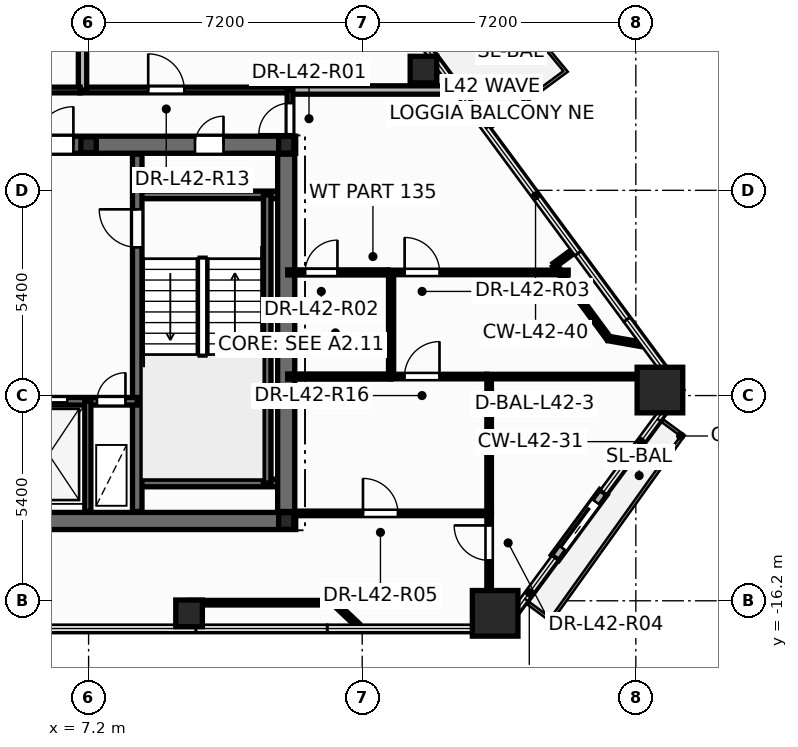
"""IFC4 building model, lengths in metres.
Left out: names, types, materials, properties, quantities, classifications, styles, units other than length and angle.
Written with IfcOpenShell. Run it as: python <this file> out.ifc"""

import sys

from ifc_helpers import new_model, si_unit, direction, frame, frame_2d, origin, origin_2d, place, context, subcontext, project, spatial, rectangle, hollow_rectangle, hollow_circle, i_section, extrude, element, fill, save


model = new_model("IFC4")
c1 = context("Model", 3, precision=1e-05, world=origin(), true_north=direction((0.0, 1.0)))
c2 = subcontext(c1, "Body", "Model", "MODEL_VIEW")
j1 = project(units=[si_unit("LENGTHUNIT", "METRE"), si_unit("PLANEANGLEUNIT", "RADIAN")], contexts=[c1])
p1 = place(None, origin())
s1 = spatial("IfcSite", under=j1, at=p1, CompositionType="ELEMENT")
p2 = place(p1, origin())
s2 = spatial("IfcBuilding", under=s1, at=p2, CompositionType="ELEMENT")
p3 = place(p2, frame((0.0, 0.0, 161.7)))
s3 = spatial("IfcBuildingStorey", under=s2, at=p3, CompositionType="ELEMENT", Elevation=161.7)
for number, where, z_axis, x_axis in (
    (1, (17.898, -16.53, 0.0), (0.0, 0.0, 1.0), (1.0, 0.0, 0.0)),
    (2, (22.234, -10.655, 0.0), (0.0, 0.0, 1.0), (1.0, 0.0, 0.0)),
):
    element("IfcColumn", number, at=place(p3, frame(where, z_axis=z_axis, x_axis=x_axis)), inside=s3, PredefinedType="COLUMN", context=c2, shape_type="SweptSolid", body=[
        extrude(hollow_rectangle(XDim=1.2, YDim=1.2, WallThickness=0.055, at=origin_2d()), origin(), (0.0, 0.0, 1.0), 3.6),
    ])
for number, where, z_axis, x_axis in (
    (3, (9.844, -16.53, 0.0), (0.0, 0.0, 1.0), (1.0, 0.0, 0.0)),
    (4, (16.012, -2.223, 0.0), (0.0, 0.0, 1.0), (1.0, 0.0, 0.0)),
):
    element("IfcColumn", number, at=place(p3, frame(where, z_axis=z_axis, x_axis=x_axis)), inside=s3, PredefinedType="COLUMN", context=c2, shape_type="SweptSolid", body=[
        extrude(hollow_circle(Radius=0.35, WallThickness=0.03, at=origin_2d()), origin(), (0.0, 0.0, 1.0), 3.6),
    ])
for number, where, z_axis, x_axis in (
    (5, (12.4, -14.1, 0.0), (0.0, 0.0, 1.0), (1.0, 0.0, 0.0)),
    (6, (12.4, -4.2, 0.0), (0.0, 0.0, 1.0), (1.0, 0.0, 0.0)),
):
    element("IfcColumn", number, at=place(p3, frame(where, z_axis=z_axis, x_axis=x_axis)), inside=s3, PredefinedType="COLUMN", context=c2, shape_type="SweptSolid", body=[
        extrude(i_section(OverallWidth=0.4, OverallDepth=0.44, WebThickness=0.028, FlangeThickness=0.04, at=origin_2d()), origin(), (0.0, 0.0, 1.0), 3.6),
    ])
p4 = place(p3, frame((7.2, -4.2, 0.0), z_axis=(0.0, 0.0, 1.0), x_axis=(1.0, 0.0, 0.0)))
e7 = element("IfcColumn", 7, at=p4, inside=s3, PredefinedType="PILASTER", context=c2, shape_type="SweptSolid", body=[
    extrude(i_section(OverallWidth=0.405, OverallDepth=0.414, WebThickness=0.022, FlangeThickness=0.032, at=origin_2d()), origin(), (0.0, 0.0, 1.0), 3.6),
])
p5 = place(p3, frame((19.475, -15.067, -0.015), z_axis=(0.0, 0.0, 1.0), x_axis=(0.593794270714, 0.804616905158, 0.0)))
e8 = element("IfcWall", 8, at=p5, inside=s3, PredefinedType="STANDARD", context=c2, shape_type="SweptSolid", body=[
    extrude(rectangle(XDim=2.14, YDim=0.24, at=frame_2d((1.07, 0.0))), origin(), (0.0, 0.0, 1.0), 2.807),
])
p6 = place(p5, frame((0.32, 0.0, 0.015)))
e9 = element("IfcOpeningElement", 9, at=p6, cuts=e8, PredefinedType="OPENING", context=c2, shape_type="SweptSolid", body=[
    extrude(rectangle(XDim=1.506, YDim=2.204, at=frame_2d((0.75, 1.102))), frame((0.0, 0.13, 0.0), z_axis=(0.0, -1.0, 0.0), x_axis=(1.0, 0.0, 0.0)), (0.0, 0.0, 1.0), 0.26),
])
p7 = place(p3, frame((-12.65, -14.1, 0.0), z_axis=(0.0, 0.0, 1.0), x_axis=(1.0, 0.0, 0.0)))
e10 = element("IfcWall", 10, at=p7, inside=s3, PredefinedType="SHEAR", context=c2, shape_type="SweptSolid", body=[
    extrude(rectangle(XDim=25.3, YDim=0.45, at=frame_2d((12.65, 0.0))), origin(), (0.0, 0.0, 1.0), 3.6),
])
p8 = place(p3, frame((-12.65, -4.2, 0.0), z_axis=(0.0, 0.0, 1.0), x_axis=(1.0, 0.0, 0.0)))
e11 = element("IfcWall", 11, at=p8, inside=s3, PredefinedType="SHEAR", context=c2, shape_type="SweptSolid", body=[
    extrude(rectangle(XDim=25.3, YDim=0.45, at=frame_2d((12.65, 0.0))), origin(), (0.0, 0.0, 1.0), 3.6),
])
p9 = place(p8, frame((1.85, 0.0, 0.0)))
e12 = element("IfcOpeningElement", 12, at=p9, cuts=e11, PredefinedType="OPENING", context=c2, shape_type="SweptSolid", body=[
    extrude(rectangle(XDim=0.756, YDim=2.054, at=frame_2d((0.375, 1.027))), frame((0.0, 0.235, 0.0), z_axis=(0.0, -1.0, 0.0), x_axis=(1.0, 0.0, 0.0)), (0.0, 0.0, 1.0), 0.47),
])
p10 = place(p8, frame((22.65, 0.0, 0.0)))
e13 = element("IfcOpeningElement", 13, at=p10, cuts=e11, PredefinedType="OPENING", context=c2, shape_type="SweptSolid", body=[
    extrude(rectangle(XDim=0.756, YDim=2.054, at=frame_2d((0.375, 1.027))), frame((0.0, 0.235, 0.0), z_axis=(0.0, -1.0, 0.0), x_axis=(1.0, 0.0, 0.0)), (0.0, 0.0, 1.0), 0.47),
])
p11 = place(p8, frame((5.85, 0.0, 0.0)))
e14 = element("IfcOpeningElement", 14, at=p11, cuts=e11, PredefinedType="OPENING", context=c2, shape_type="SweptSolid", body=[
    extrude(rectangle(XDim=1.006, YDim=2.104, at=frame_2d((0.5, 1.052))), frame((0.0, 0.235, 0.0), z_axis=(0.0, -1.0, 0.0), x_axis=(1.0, 0.0, 0.0)), (0.0, 0.0, 1.0), 0.47),
])
p12 = place(p8, frame((10.35, 0.0, 0.0)))
e15 = element("IfcOpeningElement", 15, at=p12, cuts=e11, PredefinedType="OPENING", context=c2, shape_type="SweptSolid", body=[
    extrude(rectangle(XDim=1.406, YDim=2.154, at=frame_2d((0.7, 1.077))), frame((0.0, 0.235, 0.0), z_axis=(0.0, -1.0, 0.0), x_axis=(1.0, 0.0, 0.0)), (0.0, 0.0, 1.0), 0.47),
])
p13 = place(p8, frame((18.45, 0.0, 0.0)))
e16 = element("IfcOpeningElement", 16, at=p13, cuts=e11, PredefinedType="OPENING", context=c2, shape_type="SweptSolid", body=[
    extrude(rectangle(XDim=1.006, YDim=2.104, at=frame_2d((0.5, 1.052))), frame((0.0, 0.235, 0.0), z_axis=(0.0, -1.0, 0.0), x_axis=(1.0, 0.0, 0.0)), (0.0, 0.0, 1.0), 0.47),
])
for number, where, z_axis, x_axis in (
    (17, (8.48, -5.52, 0.0), (0.0, 0.0, 1.0), (1.0, 0.0, 0.0)),
    (18, (8.48, -13.1, 0.0), (0.0, 0.0, 1.0), (1.0, 0.0, 0.0)),
):
    element("IfcWall", number, at=place(p3, frame(where, z_axis=z_axis, x_axis=x_axis)), inside=s3, PredefinedType="SOLIDWALL", context=c2, shape_type="SweptSolid", body=[
        extrude(rectangle(XDim=3.87, YDim=0.2, at=frame_2d((1.935, 0.0))), origin(), (0.0, 0.0, 1.0), 3.6),
    ])
p14 = place(p3, frame((11.9, -13.1, 0.0), z_axis=(0.0, 0.0, 1.0), x_axis=(0.0, 1.0, 0.0)))
e19 = element("IfcWall", 19, at=p14, inside=s3, PredefinedType="SOLIDWALL", context=c2, shape_type="SweptSolid", body=[
    extrude(rectangle(XDim=7.58, YDim=0.2, at=frame_2d((3.79, 0.0))), origin(), (0.0, 0.0, 1.0), 3.6),
])
p15 = place(p3, frame((8.48, -13.85, 0.0), z_axis=(0.0, 0.0, 1.0), x_axis=(0.0, 1.0, 0.0)))
e20 = element("IfcWall", 20, at=p15, inside=s3, PredefinedType="SHEAR", context=c2, shape_type="SweptSolid", body=[
    extrude(rectangle(XDim=9.4, YDim=0.25, at=frame_2d((4.7, 0.0))), origin(), (0.0, 0.0, 1.0), 3.6),
])
p16 = place(p15, frame((6.95, 0.0, 0.0)))
e21 = element("IfcOpeningElement", 21, at=p16, cuts=e20, PredefinedType="OPENING", context=c2, shape_type="SweptSolid", body=[
    extrude(rectangle(XDim=1.006, YDim=2.104, at=frame_2d((0.5, 1.052))), frame((0.0, 0.135, 0.0), z_axis=(0.0, -1.0, 0.0), x_axis=(1.0, 0.0, 0.0)), (0.0, 0.0, 1.0), 0.27),
])
p17 = place(p3, frame((5.12, -10.95, 0.0), z_axis=(0.0, 0.0, 1.0), x_axis=(1.0, 0.0, 0.0)))
e22 = element("IfcWall", 22, at=p17, inside=s3, PredefinedType="SOLIDWALL", context=c2, shape_type="SweptSolid", body=[
    extrude(rectangle(XDim=3.36, YDim=0.2, at=frame_2d((1.68, 0.0))), origin(), (0.0, 0.0, 1.0), 3.6),
])
p18 = place(p17, frame((0.42, 0.0, 0.0)))
e23 = element("IfcOpeningElement", 23, at=p18, cuts=e22, PredefinedType="OPENING", context=c2, shape_type="SweptSolid", body=[
    extrude(rectangle(XDim=1.106, YDim=2.104, at=frame_2d((0.55, 1.052))), frame((0.0, 0.11, 0.0), z_axis=(0.0, -1.0, 0.0), x_axis=(1.0, 0.0, 0.0)), (0.0, 0.0, 1.0), 0.22),
])
p19 = place(p17, frame((2.3, 0.0, 0.0)))
e24 = element("IfcOpeningElement", 24, at=p19, cuts=e22, PredefinedType="OPENING", context=c2, shape_type="SweptSolid", body=[
    extrude(rectangle(XDim=0.756, YDim=2.054, at=frame_2d((0.375, 1.027))), frame((0.0, 0.11, 0.0), z_axis=(0.0, -1.0, 0.0), x_axis=(1.0, 0.0, 0.0)), (0.0, 0.0, 1.0), 0.22),
])
p20 = place(p3, frame((7.18, -13.85, 0.0), z_axis=(0.0, 0.0, 1.0), x_axis=(0.0, 1.0, 0.0)))
e25 = element("IfcWall", 25, at=p20, inside=s3, PredefinedType="PARTITIONING", context=c2, shape_type="SweptSolid", body=[
    extrude(rectangle(XDim=2.9, YDim=0.16, at=frame_2d((1.45, 0.0))), origin(), (0.0, 0.0, 1.0), 2.475),
])
p21 = place(p3, frame((12.4, -13.85, 0.0), z_axis=(0.0, 0.0, 1.0), x_axis=(0.0, 1.0, 0.0)))
e26 = element("IfcWall", 26, at=p21, inside=s3, PredefinedType="SHEAR", context=c2, shape_type="SweptSolid", body=[
    extrude(rectangle(XDim=9.4, YDim=0.45, at=frame_2d((4.7, 0.0))), origin(), (0.0, 0.0, 1.0), 3.6),
])
p22 = place(p3, frame((6.98, -2.76, 0.0), z_axis=(0.0, 0.0, 1.0), x_axis=(1.0, 0.0, 0.0)))
e27 = element("IfcWall", 27, at=p22, inside=s3, PredefinedType="PARTITIONING", context=c2, shape_type="SweptSolid", body=[
    extrude(rectangle(XDim=5.52, YDim=0.15, at=frame_2d((2.76, 0.0))), origin(), (0.0, 0.0, 1.0), 2.325),
])
p23 = place(p22, frame((1.788, 0.0, 0.0)))
e28 = element("IfcOpeningElement", 28, at=p23, cuts=e27, PredefinedType="OPENING", context=c2, shape_type="SweptSolid", body=[
    extrude(rectangle(XDim=0.956, YDim=2.104, at=frame_2d((0.475, 1.052))), frame((0.0, 0.085, 0.0), z_axis=(0.0, -1.0, 0.0), x_axis=(1.0, 0.0, 0.0)), (0.0, 0.0, 1.0), 0.17),
])
p24 = place(p3, frame((12.652, -13.9, 0.0), z_axis=(0.0, 0.0, 1.0), x_axis=(1.0, 0.0, 0.0)))
e29 = element("IfcWall", 29, at=p24, inside=s3, PredefinedType="PARTITIONING", context=c2, shape_type="SweptSolid", body=[
    extrude(rectangle(XDim=5.088, YDim=0.12, at=frame_2d((2.544, 0.0))), origin(), (0.0, 0.0, 1.0), 3.35),
])
p25 = place(p24, frame((1.768, 0.0, 0.0)))
e30 = element("IfcOpeningElement", 30, at=p25, cuts=e29, PredefinedType="OPENING", context=c2, shape_type="SweptSolid", body=[
    extrude(rectangle(XDim=0.926, YDim=2.104, at=frame_2d((0.46, 1.052))), frame((0.0, 0.07, 0.0), z_axis=(0.0, -1.0, 0.0), x_axis=(1.0, 0.0, 0.0)), (0.0, 0.0, 1.0), 0.14),
])
p26 = place(p3, frame((7.04, -2.76, 0.0), z_axis=(0.0, 0.0, 1.0), x_axis=(0.0, 1.0, 0.0)))
e31 = element("IfcWall", 31, at=p26, inside=s3, PredefinedType="PARTITIONING", context=c2, shape_type="SweptSolid", body=[
    extrude(rectangle(XDim=4.8, YDim=0.22, at=frame_2d((2.4, 0.0))), origin(), (0.0, 0.0, 1.0), 2.325),
])
p27 = place(p3, frame((17.68, -10.3, 0.0), z_axis=(0.0, 0.0, 1.0), x_axis=(1.0, 0.0, 0.0)))
e32 = element("IfcWall", 32, at=p27, inside=s3, PredefinedType="PARTITIONING", context=c2, shape_type="SweptSolid", body=[
    extrude(rectangle(XDim=4.79, YDim=0.12, at=frame_2d((2.395, 0.0))), origin(), (0.0, 0.0, 1.0), 2.325),
])
p28 = place(p3, frame((15.08, -7.56, 0.0), z_axis=(0.0, 0.0, 1.0), x_axis=(1.0, 0.0, 0.0)))
e33 = element("IfcWall", 33, at=p28, inside=s3, PredefinedType="PARTITIONING", context=c2, shape_type="SweptSolid", body=[
    extrude(rectangle(XDim=4.74, YDim=0.12, at=frame_2d((2.37, 0.0))), origin(), (0.0, 0.0, 1.0), 2.325),
])
p29 = place(p28, frame((0.436, 0.0, 0.0)))
e34 = element("IfcOpeningElement", 34, at=p29, cuts=e33, PredefinedType="OPENING", context=c2, shape_type="SweptSolid", body=[
    extrude(rectangle(XDim=0.926, YDim=2.104, at=frame_2d((0.46, 1.052))), frame((0.0, 0.07, 0.0), z_axis=(0.0, -1.0, 0.0), x_axis=(1.0, 0.0, 0.0)), (0.0, 0.0, 1.0), 0.14),
])
p30 = place(p3, frame((2.36, -2.76, 0.0), z_axis=(0.0, 0.0, 1.0), x_axis=(1.0, 0.0, 0.0)))
e35 = element("IfcWall", 35, at=p30, inside=s3, PredefinedType="PARTITIONING", context=c2, shape_type="SweptSolid", body=[
    extrude(rectangle(XDim=4.618, YDim=0.15, at=frame_2d((2.309, 0.0))), origin(), (0.0, 0.0, 1.0), 2.919),
])
p31 = place(p3, frame((12.5, -2.76, 0.0), z_axis=(0.0, 0.0, 1.0), x_axis=(1.0, 0.0, 0.0)))
e36 = element("IfcWall", 36, at=p31, inside=s3, PredefinedType="PARTITIONING", context=c2, shape_type="SweptSolid", body=[
    extrude(rectangle(XDim=4.405, YDim=0.22, at=frame_2d((2.203, 0.0))), origin(), (0.0, 0.0, 1.0), 2.792),
])
p32 = place(p3, frame((9.846, -16.25, 0.0), z_axis=(0.0, 0.0, 1.0), x_axis=(1.0, 0.0, 0.0)))
e37 = element("IfcWall", 37, at=p32, inside=s3, PredefinedType="PARTITIONING", context=c2, shape_type="SweptSolid", body=[
    extrude(rectangle(XDim=3.811, YDim=0.12, at=frame_2d((1.906, 0.0))), origin(), (0.0, 0.0, 1.0), 2.792),
])
p33 = place(p3, frame((17.74, -13.9, 0.0), z_axis=(0.0, 0.0, 1.0), x_axis=(0.0, 1.0, 0.0)))
e38 = element("IfcWall", 38, at=p33, inside=s3, PredefinedType="PARTITIONING", context=c2, shape_type="SweptSolid", body=[
    extrude(rectangle(XDim=3.6, YDim=0.12, at=frame_2d((1.8, 0.0))), origin(), (0.0, 0.0, 1.0), 3.35),
])
p34 = place(p3, frame((17.74, -16.93, 0.0), z_axis=(0.0, 0.0, 1.0), x_axis=(0.0, 1.0, 0.0)))
e39 = element("IfcWall", 39, at=p34, inside=s3, PredefinedType="PARTITIONING", context=c2, shape_type="SweptSolid", body=[
    extrude(rectangle(XDim=3.03, YDim=0.12, at=frame_2d((1.515, 0.0))), origin(), (0.0, 0.0, 1.0), 2.792),
])
p35 = place(p34, frame((1.793, 0.0, 0.0)))
e40 = element("IfcOpeningElement", 40, at=p35, cuts=e39, PredefinedType="OPENING", context=c2, shape_type="SweptSolid", body=[
    extrude(rectangle(XDim=0.926, YDim=2.104, at=frame_2d((0.46, 1.052))), frame((0.0, 0.07, 0.0), z_axis=(0.0, -1.0, 0.0), x_axis=(1.0, 0.0, 0.0)), (0.0, 0.0, 1.0), 0.14),
])
p36 = place(p3, frame((12.44, -7.56, 0.0), z_axis=(0.0, 0.0, 1.0), x_axis=(1.0, 0.0, 0.0)))
e41 = element("IfcWall", 41, at=p36, inside=s3, PredefinedType="PARTITIONING", context=c2, shape_type="SweptSolid", body=[
    extrude(rectangle(XDim=2.638, YDim=0.135, at=frame_2d((1.319, 0.0))), origin(), (0.0, 0.0, 1.0), 2.792),
])
p37 = place(p36, frame((0.458, 0.0, 0.0)))
e42 = element("IfcOpeningElement", 42, at=p37, cuts=e41, PredefinedType="OPENING", context=c2, shape_type="SweptSolid", body=[
    extrude(rectangle(XDim=0.856, YDim=2.104, at=frame_2d((0.425, 1.052))), frame((0.0, 0.078, 0.0), z_axis=(0.0, -1.0, 0.0), x_axis=(1.0, 0.0, 0.0)), (0.0, 0.0, 1.0), 0.155),
])
p38 = place(p3, frame((15.16, -10.3, 0.0), z_axis=(0.0, 0.0, 1.0), x_axis=(0.0, 1.0, 0.0)))
e43 = element("IfcWall", 43, at=p38, inside=s3, PredefinedType="PARTITIONING", context=c2, shape_type="SweptSolid", body=[
    extrude(rectangle(XDim=2.74, YDim=0.135, at=frame_2d((1.37, 0.0))), origin(), (0.0, 0.0, 1.0), 3.35),
])
p39 = place(p3, frame((12.44, -10.3, 0.0), z_axis=(0.0, 0.0, 1.0), x_axis=(1.0, 0.0, 0.0)))
e44 = element("IfcWall", 44, at=p39, inside=s3, PredefinedType="PARTITIONING", context=c2, shape_type="SweptSolid", body=[
    extrude(rectangle(XDim=2.72, YDim=0.135, at=frame_2d((1.36, 0.0))), origin(), (0.0, 0.0, 1.0), 2.792),
])
p40 = place(p3, frame((15.16, -10.3, 0.0), z_axis=(0.0, 0.0, 1.0), x_axis=(1.0, 0.0, 0.0)))
e45 = element("IfcWall", 45, at=p40, inside=s3, PredefinedType="PARTITIONING", context=c2, shape_type="SweptSolid", body=[
    extrude(rectangle(XDim=2.518, YDim=0.12, at=frame_2d((1.259, 0.0))), origin(), (0.0, 0.0, 1.0), 3.35),
])
p41 = place(p40, frame((0.354, 0.0, 0.0)))
e46 = element("IfcOpeningElement", 46, at=p41, cuts=e45, PredefinedType="OPENING", context=c2, shape_type="SweptSolid", body=[
    extrude(rectangle(XDim=0.926, YDim=2.104, at=frame_2d((0.46, 1.052))), frame((0.0, 0.07, 0.0), z_axis=(0.0, -1.0, 0.0), x_axis=(1.0, 0.0, 0.0)), (0.0, 0.0, 1.0), 0.14),
])
p42 = place(p3, frame((20.887, -9.3, 0.0), z_axis=(0.0, 0.0, 1.0), x_axis=(-0.593808475203, 0.804606422282, 0.0)))
e47 = element("IfcWall", 47, at=p42, inside=s3, PredefinedType="PARTITIONING", context=c2, shape_type="SweptSolid", body=[
    extrude(rectangle(XDim=2.404, YDim=0.12, at=frame_2d((1.202, 0.0))), origin(), (0.0, 0.0, 1.0), 3.35),
])
p43 = place(p3, frame((12.5, -4.24, 0.0), z_axis=(0.0, 0.0, 1.0), x_axis=(0.0, 1.0, 0.0)))
e48 = element("IfcWall", 48, at=p43, inside=s3, PredefinedType="PARTITIONING", context=c2, shape_type="SweptSolid", body=[
    extrude(rectangle(XDim=1.48, YDim=0.15, at=frame_2d((0.74, 0.0))), origin(), (0.0, 0.0, 1.0), 2.325),
])
p44 = place(p43, frame((0.315, 0.0, 0.0)))
e49 = element("IfcOpeningElement", 49, at=p44, cuts=e48, PredefinedType="OPENING", context=c2, shape_type="SweptSolid", body=[
    extrude(rectangle(XDim=0.826, YDim=2.104, at=frame_2d((0.41, 1.052))), frame((0.0, 0.085, 0.0), z_axis=(0.0, -1.0, 0.0), x_axis=(1.0, 0.0, 0.0)), (0.0, 0.0, 1.0), 0.17),
])
for number, where, z_axis, x_axis in (
    (50, (13.658, -16.25, 0.0), (0.0, 0.0, 1.0), (0.726, -0.687, 0.0)),
    (51, (21.724, -9.448, 0.0), (0.0, 0.0, 1.0), (-0.985, 0.174, 0.0)),
):
    element("IfcWall", number, at=place(p3, frame(where, z_axis=z_axis, x_axis=x_axis)), inside=s3, PredefinedType="PARTITIONING", context=c2, shape_type="SweptSolid", body=[
        extrude(rectangle(XDim=0.85, YDim=0.12, at=frame_2d((0.425, 0.0))), origin(), (0.0, 0.0, 1.0), 2.792),
    ])
for number, where, z_axis, x_axis in (
    (52, (19.459, -7.366, 0.0), (0.0, 0.0, 1.0), (0.805, 0.594, 0.0)),
    (53, (9.846, -16.92, 0.0), (0.0, 0.0, 1.0), (0.0, 1.0, 0.0)),
):
    element("IfcWall", number, at=place(p3, frame(where, z_axis=z_axis, x_axis=x_axis)), inside=s3, PredefinedType="PARTITIONING", context=c2, shape_type="SweptSolid", body=[
        extrude(rectangle(XDim=0.67, YDim=0.12, at=frame_2d((0.335, 0.0))), origin(), (0.0, 0.0, 1.0), 2.792),
    ])
p45 = place(p6, origin())
e54 = element("IfcDoor", 54, at=p45, inside=s3, OperationType="SLIDING_TO_RIGHT", PredefinedType="DOOR", context=c2, shape_type="SweptSolid", body=[
    extrude(rectangle(XDim=1.5, YDim=2.2, at=frame_2d((0.75, 1.1))), frame((0.0, 0.025, 0.0), z_axis=(0.0, -1.0, 0.0), x_axis=(1.0, 0.0, 0.0)), (0.0, 0.0, 1.0), 0.05),
])
fill(e9, e54)
p46 = place(p16, origin())
e55 = element("IfcDoor", 55, at=p46, inside=s3, OperationType="SINGLE_SWING_RIGHT", PredefinedType="DOOR", context=c2, shape_type="SweptSolid", body=[
    extrude(rectangle(XDim=1.0, YDim=2.1, at=frame_2d((0.5, 1.05))), frame((0.0, 0.025, 0.0), z_axis=(0.0, -1.0, 0.0), x_axis=(1.0, 0.0, 0.0)), (0.0, 0.0, 1.0), 0.05),
])
fill(e21, e55)
p47 = place(p18, origin())
e56 = element("IfcDoor", 56, at=p47, inside=s3, OperationType="DOUBLE_DOOR_SLIDING", PredefinedType="DOOR", context=c2, shape_type="SweptSolid", body=[
    extrude(rectangle(XDim=1.1, YDim=2.1, at=frame_2d((0.55, 1.05))), frame((0.0, 0.025, 0.0), z_axis=(0.0, -1.0, 0.0), x_axis=(1.0, 0.0, 0.0)), (0.0, 0.0, 1.0), 0.05),
])
fill(e23, e56)
p48 = place(p19, origin())
e57 = element("IfcDoor", 57, at=p48, inside=s3, OperationType="SINGLE_SWING_RIGHT", PredefinedType="DOOR", context=c2, shape_type="SweptSolid", body=[
    extrude(rectangle(XDim=0.75, YDim=2.05, at=frame_2d((0.375, 1.025))), frame((0.0, 0.025, 0.0), z_axis=(0.0, -1.0, 0.0), x_axis=(1.0, 0.0, 0.0)), (0.0, 0.0, 1.0), 0.05),
])
fill(e24, e57)
p49 = place(p10, origin())
e58 = element("IfcDoor", 58, at=p49, inside=s3, OperationType="SINGLE_SWING_RIGHT", PredefinedType="DOOR", context=c2, shape_type="SweptSolid", body=[
    extrude(rectangle(XDim=0.75, YDim=2.05, at=frame_2d((0.375, 1.025))), frame((0.0, 0.025, 0.0), z_axis=(0.0, -1.0, 0.0), x_axis=(1.0, 0.0, 0.0)), (0.0, 0.0, 1.0), 0.05),
])
fill(e13, e58)
p50 = place(p13, origin())
e59 = element("IfcDoor", 59, at=p50, inside=s3, OperationType="SINGLE_SWING_RIGHT", PredefinedType="DOOR", context=c2, shape_type="SweptSolid", body=[
    extrude(rectangle(XDim=1.0, YDim=2.1, at=frame_2d((0.5, 1.05))), frame((0.0, 0.025, 0.0), z_axis=(0.0, -1.0, 0.0), x_axis=(1.0, 0.0, 0.0)), (0.0, 0.0, 1.0), 0.05),
])
fill(e16, e59)
p51 = place(p44, origin())
e60 = element("IfcDoor", 60, at=p51, inside=s3, OperationType="SINGLE_SWING_LEFT", PredefinedType="DOOR", context=c2, shape_type="SweptSolid", body=[
    extrude(rectangle(XDim=0.82, YDim=2.1, at=frame_2d((0.41, 1.05))), frame((0.0, 0.025, 0.0), z_axis=(0.0, -1.0, 0.0), x_axis=(1.0, 0.0, 0.0)), (0.0, 0.0, 1.0), 0.05),
])
fill(e49, e60)
p52 = place(p37, origin())
e61 = element("IfcDoor", 61, at=p52, inside=s3, OperationType="SINGLE_SWING_RIGHT", PredefinedType="DOOR", context=c2, shape_type="SweptSolid", body=[
    extrude(rectangle(XDim=0.85, YDim=2.1, at=frame_2d((0.425, 1.05))), frame((0.0, 0.025, 0.0), z_axis=(0.0, -1.0, 0.0), x_axis=(1.0, 0.0, 0.0)), (0.0, 0.0, 1.0), 0.05),
])
fill(e42, e61)
p53 = place(p29, origin())
e62 = element("IfcDoor", 62, at=p53, inside=s3, OperationType="SINGLE_SWING_LEFT", PredefinedType="DOOR", context=c2, shape_type="SweptSolid", body=[
    extrude(rectangle(XDim=0.92, YDim=2.1, at=frame_2d((0.46, 1.05))), frame((0.0, 0.025, 0.0), z_axis=(0.0, -1.0, 0.0), x_axis=(1.0, 0.0, 0.0)), (0.0, 0.0, 1.0), 0.05),
])
fill(e34, e62)
p54 = place(p35, origin())
e63 = element("IfcDoor", 63, at=p54, inside=s3, OperationType="SINGLE_SWING_RIGHT", PredefinedType="DOOR", context=c2, shape_type="SweptSolid", body=[
    extrude(rectangle(XDim=0.92, YDim=2.1, at=frame_2d((0.46, 1.05))), frame((0.0, 0.025, 0.0), z_axis=(0.0, -1.0, 0.0), x_axis=(1.0, 0.0, 0.0)), (0.0, 0.0, 1.0), 0.05),
])
fill(e40, e63)
p55 = place(p25, origin())
e64 = element("IfcDoor", 64, at=p55, inside=s3, OperationType="SINGLE_SWING_LEFT", PredefinedType="DOOR", context=c2, shape_type="SweptSolid", body=[
    extrude(rectangle(XDim=0.92, YDim=2.1, at=frame_2d((0.46, 1.05))), frame((0.0, 0.025, 0.0), z_axis=(0.0, -1.0, 0.0), x_axis=(1.0, 0.0, 0.0)), (0.0, 0.0, 1.0), 0.05),
])
fill(e30, e64)
p56 = place(p23, origin())
e65 = element("IfcDoor", 65, at=p56, inside=s3, OperationType="SINGLE_SWING_LEFT", PredefinedType="DOOR", context=c2, shape_type="SweptSolid", body=[
    extrude(rectangle(XDim=0.95, YDim=2.1, at=frame_2d((0.475, 1.05))), frame((0.0, 0.025, 0.0), z_axis=(0.0, -1.0, 0.0), x_axis=(1.0, 0.0, 0.0)), (0.0, 0.0, 1.0), 0.05),
])
fill(e28, e65)
p57 = place(p41, origin())
e66 = element("IfcDoor", 66, at=p57, inside=s3, OperationType="SINGLE_SWING_RIGHT", PredefinedType="DOOR", context=c2, shape_type="SweptSolid", body=[
    extrude(rectangle(XDim=0.92, YDim=2.1, at=frame_2d((0.46, 1.05))), frame((0.0, 0.025, 0.0), z_axis=(0.0, -1.0, 0.0), x_axis=(1.0, 0.0, 0.0)), (0.0, 0.0, 1.0), 0.05),
])
fill(e46, e66)
save(model, sys.argv[1])
